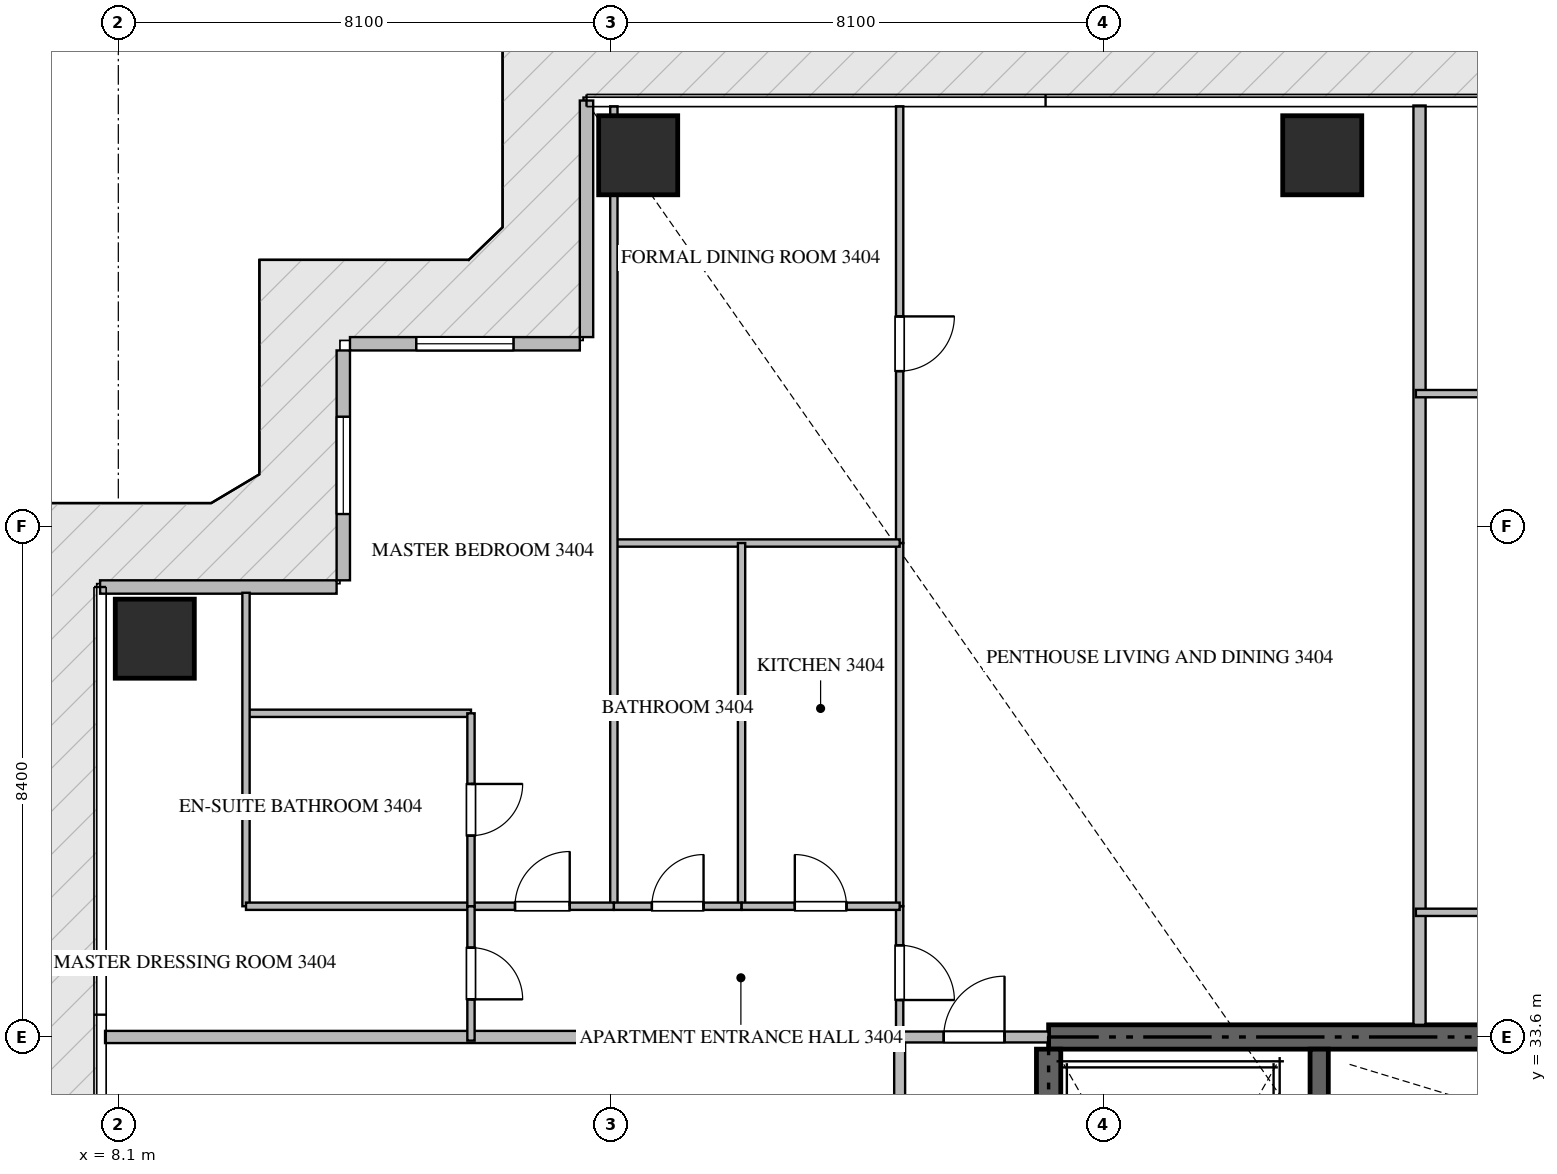
"""IFC4 building model, lengths in metres.
Left out: names, types, materials, properties, quantities, classifications, styles, units other than length and angle.
Written with IfcOpenShell. Run it as: python <this file> out.ifc"""

import sys

from ifc_helpers import new_model, si_unit, direction, frame, frame_2d, origin, origin_2d, place, context, subcontext, project, spatial, rectangle, extrude, source, transform, mapped, element, fill, save


model = new_model("IFC4")
c1 = context("Model", 3, precision=1e-05, world=origin(), true_north=direction((0.0, 1.0)))
c2 = subcontext(c1, "Body", "Model", "MODEL_VIEW")
j1 = project(units=[si_unit("LENGTHUNIT", "METRE"), si_unit("PLANEANGLEUNIT", "RADIAN")], contexts=[c1])
p1 = place(None, origin())
s1 = spatial("IfcSite", under=j1, at=p1, CompositionType="ELEMENT")
p2 = place(p1, origin())
s2 = spatial("IfcBuilding", under=s1, at=p2, CompositionType="ELEMENT")
p3 = place(p2, frame((0.0, 0.0, 138.9)))
s3 = spatial("IfcBuildingStorey", under=s2, at=p3, CompositionType="ELEMENT", Elevation=138.9)
p4 = place(p3, frame((41.4, 33.6, -0.26), z_axis=(0.0, 0.0, 1.0), x_axis=(-1.0, 0.0, 0.0)))
e1 = element("IfcWall", 1, at=p4, inside=s3, PredefinedType="SHEAR", context=c2, shape_type="SweptSolid", body=[
    extrude(rectangle(XDim=18.0, YDim=0.4, at=frame_2d((9.0, 0.0))), origin(), (0.0, 0.0, 1.0), 3.748),
])
p5 = place(p3, frame((23.4, 24.25, -0.26), z_axis=(0.0, 0.0, 1.0), x_axis=(0.0, 1.0, 0.0)))
e2 = element("IfcWall", 2, at=p5, inside=s3, PredefinedType="SHEAR", context=c2, shape_type="SweptSolid", body=[
    extrude(rectangle(XDim=9.15, YDim=0.4, at=frame_2d((4.575, 0.0))), origin(), (0.0, 0.0, 1.0), 3.748),
])
p6 = place(p3, frame((27.85, 23.55, -0.26), z_axis=(0.0, 0.0, 1.0), x_axis=(0.0, 1.0, 0.0)))
e3 = element("IfcWall", 3, at=p6, inside=s3, PredefinedType="SHEAR", context=c2, shape_type="SweptSolid", body=[
    extrude(rectangle(XDim=9.85, YDim=0.3, at=frame_2d((4.925, 0.0))), origin(), (0.0, 0.0, 1.0), 3.748),
])
m1 = source(origin(), c2, "Body", "SweptSolid", [
    extrude(rectangle(XDim=1.3, YDim=1.3, at=origin_2d()), origin(), (0.0, 0.0, 1.0), 3.75),
])
for number, where, z_axis, x_axis in (
    (4, (16.65, 48.1, -0.26), (0.0, 0.0, 1.0), (1.0, 0.0, 0.0)),
    (5, (27.9, 48.1, -0.26), (0.0, 0.0, 1.0), (1.0, 0.0, 0.0)),
    (6, (8.7, 40.15, -0.26), (0.0, 0.0, 1.0), (1.0, 0.0, 0.0)),
):
    element("IfcColumn", number, at=place(p3, frame(where, z_axis=z_axis, x_axis=x_axis)), inside=s3, PredefinedType="COLUMN", context=c2, shape_type="MappedRepresentation", body=[
        mapped(m1, transform((0.0, 0.0, 0.0), scale=1.0)),
    ])
p7 = place(p3, frame((15.8, 49.0, 0.0), z_axis=(0.0, 0.0, 1.0), x_axis=(0.0, -1.0, 0.0)))
e7 = element("IfcWall", 7, at=p7, inside=s3, PredefinedType="ELEMENTEDWALL", context=c2, shape_type="SweptSolid", body=[
    extrude(rectangle(XDim=3.89, YDim=0.22, at=frame_2d((1.945, 0.0))), origin(), (0.0, 0.0, 1.0), 3.475),
])
p8 = place(p3, frame((15.69, 45.0, 0.0), z_axis=(0.0, 0.0, 1.0), x_axis=(-1.0, 0.0, 0.0)))
e8 = element("IfcWall", 8, at=p8, inside=s3, PredefinedType="ELEMENTEDWALL", context=c2, shape_type="SweptSolid", body=[
    extrude(rectangle(XDim=3.78, YDim=0.22, at=frame_2d((1.89, 0.0))), origin(), (0.0, 0.0, 1.0), 3.475),
])
p9 = place(p8, frame((1.09, 0.0, 0.65)))
e9 = element("IfcOpeningElement", 9, at=p9, cuts=e8, PredefinedType="OPENING", context=c2, shape_type="SweptSolid", body=[
    extrude(rectangle(XDim=1.6, YDim=2.1, at=frame_2d((0.8, 1.05))), frame((0.0, 0.12, 0.0), z_axis=(0.0, -1.0, 0.0), x_axis=(1.0, 0.0, 0.0)), (0.0, 0.0, 1.0), 0.24),
])
p10 = place(p3, frame((11.8, 44.89, 0.0), z_axis=(0.0, 0.0, 1.0), x_axis=(0.0, -1.0, 0.0)))
e10 = element("IfcWall", 10, at=p10, inside=s3, PredefinedType="ELEMENTEDWALL", context=c2, shape_type="SweptSolid", body=[
    extrude(rectangle(XDim=3.78, YDim=0.22, at=frame_2d((1.89, 0.0))), origin(), (0.0, 0.0, 1.0), 3.475),
])
p11 = place(p10, frame((1.09, 0.0, 0.65)))
e11 = element("IfcOpeningElement", 11, at=p11, cuts=e10, PredefinedType="OPENING", context=c2, shape_type="SweptSolid", body=[
    extrude(rectangle(XDim=1.6, YDim=2.1, at=frame_2d((0.8, 1.05))), frame((0.0, 0.12, 0.0), z_axis=(0.0, -1.0, 0.0), x_axis=(1.0, 0.0, 0.0)), (0.0, 0.0, 1.0), 0.24),
])
p12 = place(p3, frame((11.69, 41.0, 0.0), z_axis=(0.0, 0.0, 1.0), x_axis=(-1.0, 0.0, 0.0)))
e12 = element("IfcWall", 12, at=p12, inside=s3, PredefinedType="ELEMENTEDWALL", context=c2, shape_type="SweptSolid", body=[
    extrude(rectangle(XDim=3.89, YDim=0.22, at=frame_2d((1.945, 0.0))), origin(), (0.0, 0.0, 1.0), 3.475),
])
p13 = place(p3, frame((29.5, 33.8, 0.0), z_axis=(0.0, 0.0, 1.0), x_axis=(0.0, 1.0, 0.0)))
e13 = element("IfcWall", 13, at=p13, inside=s3, PredefinedType="PARTITIONING", context=c2, shape_type="SweptSolid", body=[
    extrude(rectangle(XDim=15.118, YDim=0.2, at=frame_2d((7.559, 0.0))), origin(), (0.0, 0.0, 1.0), 3.49),
])
p14 = place(p3, frame((7.882, 33.6, 0.0), z_axis=(0.0, 0.0, 1.0), x_axis=(1.0, 0.0, 0.0)))
e14 = element("IfcWall", 14, at=p14, inside=s3, PredefinedType="PARTITIONING", context=c2, shape_type="SweptSolid", body=[
    extrude(rectangle(XDim=13.068, YDim=0.2, at=frame_2d((6.534, 0.0))), origin(), (0.0, 0.0, 1.0), 3.49),
])
p15 = place(p3, frame((20.95, 14.9, 0.0), z_axis=(0.0, 0.0, 1.0), x_axis=(0.0, 1.0, 0.0)))
e15 = element("IfcWall", 15, at=p15, inside=s3, PredefinedType="PARTITIONING", context=c2, shape_type="SweptSolid", body=[
    extrude(rectangle(XDim=18.7, YDim=0.18, at=frame_2d((9.35, 0.0))), origin(), (0.0, 0.0, 1.0), 3.49),
])
p16 = place(p15, frame((14.603, 0.0, 0.0)))
e16 = element("IfcOpeningElement", 16, at=p16, cuts=e15, PredefinedType="OPENING", context=c2, shape_type="SweptSolid", body=[
    extrude(rectangle(XDim=1.0, YDim=2.15, at=frame_2d((0.5, 1.075))), frame((0.0, 0.1, 0.0), z_axis=(0.0, -1.0, 0.0), x_axis=(1.0, 0.0, 0.0)), (0.0, 0.0, 1.0), 0.2),
])
p17 = place(p3, frame((20.952, 33.6, 0.0), z_axis=(0.0, 0.0, 1.0), x_axis=(1.0, 0.0, 0.0)))
e17 = element("IfcWall", 17, at=p17, inside=s3, PredefinedType="PARTITIONING", context=c2, shape_type="SweptSolid", body=[
    extrude(rectangle(XDim=2.446, YDim=0.18, at=frame_2d((1.223, 0.0))), origin(), (0.0, 0.0, 1.0), 3.49),
])
p18 = place(p17, frame((0.723, 0.0, 0.0)))
e18 = element("IfcOpeningElement", 18, at=p18, cuts=e17, PredefinedType="OPENING", context=c2, shape_type="SweptSolid", body=[
    extrude(rectangle(XDim=1.0, YDim=2.15, at=frame_2d((0.5, 1.075))), frame((0.0, 0.1, 0.0), z_axis=(0.0, -1.0, 0.0), x_axis=(1.0, 0.0, 0.0)), (0.0, 0.0, 1.0), 0.2),
])
p19 = place(p3, frame((20.95, 35.75, 0.0), z_axis=(0.0, 0.0, 1.0), x_axis=(0.0, -1.0, 0.0)))
e19 = element("IfcWall", 19, at=p19, inside=s3, PredefinedType="PARTITIONING", context=c2, shape_type="SweptSolid", body=[
    extrude(rectangle(XDim=2.148, YDim=0.12, at=frame_2d((1.074, 0.0))), origin(), (0.0, 0.0, 1.0), 3.49),
])
p20 = place(p19, frame((0.642, 0.0, 0.0)))
e20 = element("IfcOpeningElement", 20, at=p20, cuts=e19, PredefinedType="OPENING", context=c2, shape_type="SweptSolid", body=[
    extrude(rectangle(XDim=0.9, YDim=2.1, at=frame_2d((0.45, 1.05))), frame((0.0, 0.07, 0.0), z_axis=(0.0, -1.0, 0.0), x_axis=(1.0, 0.0, 0.0)), (0.0, 0.0, 1.0), 0.14),
])
p21 = place(p3, frame((20.95, 48.905, 0.0), z_axis=(0.0, 0.0, 1.0), x_axis=(0.0, -1.0, 0.0)))
e21 = element("IfcWall", 21, at=p21, inside=s3, PredefinedType="PARTITIONING", context=c2, shape_type="SweptSolid", body=[
    extrude(rectangle(XDim=7.182, YDim=0.12, at=frame_2d((3.591, 0.0))), origin(), (0.0, 0.0, 1.0), 3.49),
])
p22 = place(p21, frame((3.455, 0.0, 0.0)))
e22 = element("IfcOpeningElement", 22, at=p22, cuts=e21, PredefinedType="OPENING", context=c2, shape_type="SweptSolid", body=[
    extrude(rectangle(XDim=0.9, YDim=2.1, at=frame_2d((0.45, 1.05))), frame((0.0, 0.07, 0.0), z_axis=(0.0, -1.0, 0.0), x_axis=(1.0, 0.0, 0.0)), (0.0, 0.0, 1.0), 0.14),
])
p23 = place(p3, frame((20.95, 41.721, 0.0), z_axis=(0.0, 0.0, 1.0), x_axis=(0.0, -1.0, 0.0)))
e23 = element("IfcWall", 23, at=p23, inside=s3, PredefinedType="PARTITIONING", context=c2, shape_type="SweptSolid", body=[
    extrude(rectangle(XDim=5.969, YDim=0.12, at=frame_2d((2.984, 0.0))), origin(), (0.0, 0.0, 1.0), 3.49),
])
p24 = place(p3, frame((16.25, 41.723, 0.0), z_axis=(0.0, 0.0, 1.0), x_axis=(1.0, 0.0, 0.0)))
e24 = element("IfcWall", 24, at=p24, inside=s3, PredefinedType="PARTITIONING", context=c2, shape_type="SweptSolid", body=[
    extrude(rectangle(XDim=4.7, YDim=0.12, at=frame_2d((2.35, 0.0))), origin(), (0.0, 0.0, 1.0), 3.49),
])
p25 = place(p3, frame((16.25, 48.905, 0.0), z_axis=(0.0, 0.0, 1.0), x_axis=(0.0, -1.0, 0.0)))
e25 = element("IfcWall", 25, at=p25, inside=s3, PredefinedType="PARTITIONING", context=c2, shape_type="SweptSolid", body=[
    extrude(rectangle(XDim=13.155, YDim=0.12, at=frame_2d((6.578, 0.0))), origin(), (0.0, 0.0, 1.0), 3.49),
])
p26 = place(p3, frame((18.35, 41.723, 0.0), z_axis=(0.0, 0.0, 1.0), x_axis=(0.0, -1.0, 0.0)))
e26 = element("IfcWall", 26, at=p26, inside=s3, PredefinedType="PARTITIONING", context=c2, shape_type="SweptSolid", body=[
    extrude(rectangle(XDim=5.973, YDim=0.12, at=frame_2d((2.986, 0.0))), origin(), (0.0, 0.0, 1.0), 3.49),
])
p27 = place(p3, frame((16.25, 35.75, 0.0), z_axis=(0.0, 0.0, 1.0), x_axis=(1.0, 0.0, 0.0)))
e27 = element("IfcWall", 27, at=p27, inside=s3, PredefinedType="PARTITIONING", context=c2, shape_type="SweptSolid", body=[
    extrude(rectangle(XDim=2.1, YDim=0.12, at=frame_2d((1.05, 0.0))), origin(), (0.0, 0.0, 1.0), 3.49),
])
p28 = place(p27, frame((0.625, 0.0, 0.0)))
e28 = element("IfcOpeningElement", 28, at=p28, cuts=e27, PredefinedType="OPENING", context=c2, shape_type="SweptSolid", body=[
    extrude(rectangle(XDim=0.85, YDim=2.1, at=frame_2d((0.425, 1.05))), frame((0.0, 0.07, 0.0), z_axis=(0.0, -1.0, 0.0), x_axis=(1.0, 0.0, 0.0)), (0.0, 0.0, 1.0), 0.14),
])
p29 = place(p3, frame((18.352, 35.75, 0.0), z_axis=(0.0, 0.0, 1.0), x_axis=(1.0, 0.0, 0.0)))
e29 = element("IfcWall", 29, at=p29, inside=s3, PredefinedType="PARTITIONING", context=c2, shape_type="SweptSolid", body=[
    extrude(rectangle(XDim=2.598, YDim=0.12, at=frame_2d((1.299, 0.0))), origin(), (0.0, 0.0, 1.0), 3.49),
])
p30 = place(p29, frame((0.874, 0.0, 0.0)))
e30 = element("IfcOpeningElement", 30, at=p30, cuts=e29, PredefinedType="OPENING", context=c2, shape_type="SweptSolid", body=[
    extrude(rectangle(XDim=0.85, YDim=2.1, at=frame_2d((0.425, 1.05))), frame((0.0, 0.07, 0.0), z_axis=(0.0, -1.0, 0.0), x_axis=(1.0, 0.0, 0.0)), (0.0, 0.0, 1.0), 0.14),
])
p31 = place(p3, frame((13.9, 35.75, 0.0), z_axis=(0.0, 0.0, 1.0), x_axis=(1.0, 0.0, 0.0)))
e31 = element("IfcWall", 31, at=p31, inside=s3, PredefinedType="PARTITIONING", context=c2, shape_type="SweptSolid", body=[
    extrude(rectangle(XDim=2.348, YDim=0.12, at=frame_2d((1.174, 0.0))), origin(), (0.0, 0.0, 1.0), 3.49),
])
p32 = place(p31, frame((0.724, 0.0, 0.0)))
e32 = element("IfcOpeningElement", 32, at=p32, cuts=e31, PredefinedType="OPENING", context=c2, shape_type="SweptSolid", body=[
    extrude(rectangle(XDim=0.9, YDim=2.1, at=frame_2d((0.45, 1.05))), frame((0.0, 0.07, 0.0), z_axis=(0.0, -1.0, 0.0), x_axis=(1.0, 0.0, 0.0)), (0.0, 0.0, 1.0), 0.14),
])
p33 = place(p3, frame((10.2, 38.923, 0.0), z_axis=(0.0, 0.0, 1.0), x_axis=(1.0, 0.0, 0.0)))
e33 = element("IfcWall", 33, at=p33, inside=s3, PredefinedType="PARTITIONING", context=c2, shape_type="SweptSolid", body=[
    extrude(rectangle(XDim=3.7, YDim=0.12, at=frame_2d((1.85, 0.0))), origin(), (0.0, 0.0, 1.0), 3.49),
])
p34 = place(p3, frame((10.2, 40.905, 0.0), z_axis=(0.0, 0.0, 1.0), x_axis=(0.0, -1.0, 0.0)))
e34 = element("IfcWall", 34, at=p34, inside=s3, PredefinedType="PARTITIONING", context=c2, shape_type="SweptSolid", body=[
    extrude(rectangle(XDim=5.155, YDim=0.12, at=frame_2d((2.578, 0.0))), origin(), (0.0, 0.0, 1.0), 3.49),
])
p35 = place(p3, frame((10.2, 35.75, 0.0), z_axis=(0.0, 0.0, 1.0), x_axis=(1.0, 0.0, 0.0)))
e35 = element("IfcWall", 35, at=p35, inside=s3, PredefinedType="PARTITIONING", context=c2, shape_type="SweptSolid", body=[
    extrude(rectangle(XDim=3.698, YDim=0.12, at=frame_2d((1.849, 0.0))), origin(), (0.0, 0.0, 1.0), 3.49),
])
p36 = place(p3, frame((13.9, 38.923, 0.0), z_axis=(0.0, 0.0, 1.0), x_axis=(0.0, -1.0, 0.0)))
e36 = element("IfcWall", 36, at=p36, inside=s3, PredefinedType="PARTITIONING", context=c2, shape_type="SweptSolid", body=[
    extrude(rectangle(XDim=3.173, YDim=0.12, at=frame_2d((1.586, 0.0))), origin(), (0.0, 0.0, 1.0), 3.49),
])
p37 = place(p36, frame((1.162, 0.0, 0.0)))
e37 = element("IfcOpeningElement", 37, at=p37, cuts=e36, PredefinedType="OPENING", context=c2, shape_type="SweptSolid", body=[
    extrude(rectangle(XDim=0.85, YDim=2.1, at=frame_2d((0.425, 1.05))), frame((0.0, 0.07, 0.0), z_axis=(0.0, -1.0, 0.0), x_axis=(1.0, 0.0, 0.0)), (0.0, 0.0, 1.0), 0.14),
])
p38 = place(p3, frame((13.9, 35.748, 0.0), z_axis=(0.0, 0.0, 1.0), x_axis=(0.0, -1.0, 0.0)))
e38 = element("IfcWall", 38, at=p38, inside=s3, PredefinedType="PARTITIONING", context=c2, shape_type="SweptSolid", body=[
    extrude(rectangle(XDim=2.208, YDim=0.12, at=frame_2d((1.104, 0.0))), origin(), (0.0, 0.0, 1.0), 3.49),
])
p39 = place(p38, frame((0.679, 0.0, 0.0)))
e39 = element("IfcOpeningElement", 39, at=p39, cuts=e38, PredefinedType="OPENING", context=c2, shape_type="SweptSolid", body=[
    extrude(rectangle(XDim=0.85, YDim=2.1, at=frame_2d((0.425, 1.05))), frame((0.0, 0.07, 0.0), z_axis=(0.0, -1.0, 0.0), x_axis=(1.0, 0.0, 0.0)), (0.0, 0.0, 1.0), 0.14),
])
for number, where, z_axis, x_axis in (
    (40, (29.44, 44.18, 0.0), (0.0, 0.0, 1.0), (1.0, 0.0, 0.0)),
    (41, (29.44, 35.65, 0.0), (0.0, 0.0, 1.0), (1.0, 0.0, 0.0)),
):
    element("IfcWall", number, at=place(p3, frame(where, z_axis=z_axis, x_axis=x_axis)), inside=s3, PredefinedType="PARTITIONING", context=c2, shape_type="SweptSolid", body=[
        extrude(rectangle(XDim=9.06, YDim=0.12, at=frame_2d((4.53, 0.0))), origin(), (0.0, 0.0, 1.0), 3.49),
    ])
m2 = source(origin(), c2, "Body", "SweptSolid", [
    extrude(rectangle(XDim=1.6, YDim=2.1, at=frame_2d((0.8, 1.05))), frame((0.0, 0.03, 0.0), z_axis=(0.0, -1.0, 0.0), x_axis=(1.0, 0.0, 0.0)), (0.0, 0.0, 1.0), 0.06),
])
p40 = place(p9, origin())
e42 = element("IfcWindow", 42, at=p40, inside=s3, PartitioningType="SINGLE_PANEL", PredefinedType="WINDOW", context=c2, shape_type="MappedRepresentation", body=[
    mapped(m2, transform((0.0, 0.0, 0.0), scale=1.0)),
])
fill(e9, e42)
p41 = place(p11, origin())
e43 = element("IfcWindow", 43, at=p41, inside=s3, PartitioningType="SINGLE_PANEL", PredefinedType="WINDOW", context=c2, shape_type="MappedRepresentation", body=[
    mapped(m2, transform((0.0, 0.0, 0.0), scale=1.0)),
])
fill(e11, e43)
m3 = source(origin(), c2, "Body", "SweptSolid", [
    extrude(rectangle(XDim=1.0, YDim=2.15, at=frame_2d((0.5, 1.075))), frame((0.0, 0.025, 0.0), z_axis=(0.0, -1.0, 0.0), x_axis=(1.0, 0.0, 0.0)), (0.0, 0.0, 1.0), 0.05),
])
p42 = place(p18, origin())
e44 = element("IfcDoor", 44, at=p42, inside=s3, OperationType="SINGLE_SWING_RIGHT", PredefinedType="DOOR", context=c2, shape_type="MappedRepresentation", body=[
    mapped(m3, transform((0.0, 0.0, 0.0), scale=1.0)),
])
fill(e18, e44)
m4 = source(origin(), c2, "Body", "SweptSolid", [
    extrude(rectangle(XDim=0.9, YDim=2.1, at=frame_2d((0.45, 1.05))), frame((0.0, 0.025, 0.0), z_axis=(0.0, -1.0, 0.0), x_axis=(1.0, 0.0, 0.0)), (0.0, 0.0, 1.0), 0.05),
])
p43 = place(p20, origin())
e45 = element("IfcDoor", 45, at=p43, inside=s3, OperationType="SINGLE_SWING_RIGHT", PredefinedType="DOOR", context=c2, shape_type="MappedRepresentation", body=[
    mapped(m4, transform((0.0, 0.0, 0.0), scale=1.0)),
])
fill(e20, e45)
p44 = place(p22, origin())
e46 = element("IfcDoor", 46, at=p44, inside=s3, OperationType="SINGLE_SWING_LEFT", PredefinedType="DOOR", context=c2, shape_type="MappedRepresentation", body=[
    mapped(m4, transform((0.0, 0.0, 0.0), scale=1.0)),
])
fill(e22, e46)
m5 = source(origin(), c2, "Body", "SweptSolid", [
    extrude(rectangle(XDim=0.85, YDim=2.1, at=frame_2d((0.425, 1.05))), frame((0.0, 0.025, 0.0), z_axis=(0.0, -1.0, 0.0), x_axis=(1.0, 0.0, 0.0)), (0.0, 0.0, 1.0), 0.05),
])
p45 = place(p28, origin())
e47 = element("IfcDoor", 47, at=p45, inside=s3, OperationType="SINGLE_SWING_RIGHT", PredefinedType="DOOR", context=c2, shape_type="MappedRepresentation", body=[
    mapped(m5, transform((0.0, 0.0, 0.0), scale=1.0)),
])
fill(e28, e47)
p46 = place(p30, origin())
e48 = element("IfcDoor", 48, at=p46, inside=s3, OperationType="SINGLE_SWING_LEFT", PredefinedType="DOOR", context=c2, shape_type="MappedRepresentation", body=[
    mapped(m5, transform((0.0, 0.0, 0.0), scale=1.0)),
])
fill(e30, e48)
p47 = place(p32, origin())
e49 = element("IfcDoor", 49, at=p47, inside=s3, OperationType="SINGLE_SWING_RIGHT", PredefinedType="DOOR", context=c2, shape_type="MappedRepresentation", body=[
    mapped(m4, transform((0.0, 0.0, 0.0), scale=1.0)),
])
fill(e32, e49)
p48 = place(p37, origin())
e50 = element("IfcDoor", 50, at=p48, inside=s3, OperationType="SINGLE_SWING_LEFT", PredefinedType="DOOR", context=c2, shape_type="MappedRepresentation", body=[
    mapped(m5, transform((0.0, 0.0, 0.0), scale=1.0)),
])
fill(e37, e50)
p49 = place(p39, origin())
e51 = element("IfcDoor", 51, at=p49, inside=s3, OperationType="SINGLE_SWING_RIGHT", PredefinedType="DOOR", context=c2, shape_type="MappedRepresentation", body=[
    mapped(m5, transform((0.0, 0.0, 0.0), scale=1.0)),
])
fill(e39, e51)
save(model, sys.argv[1])
